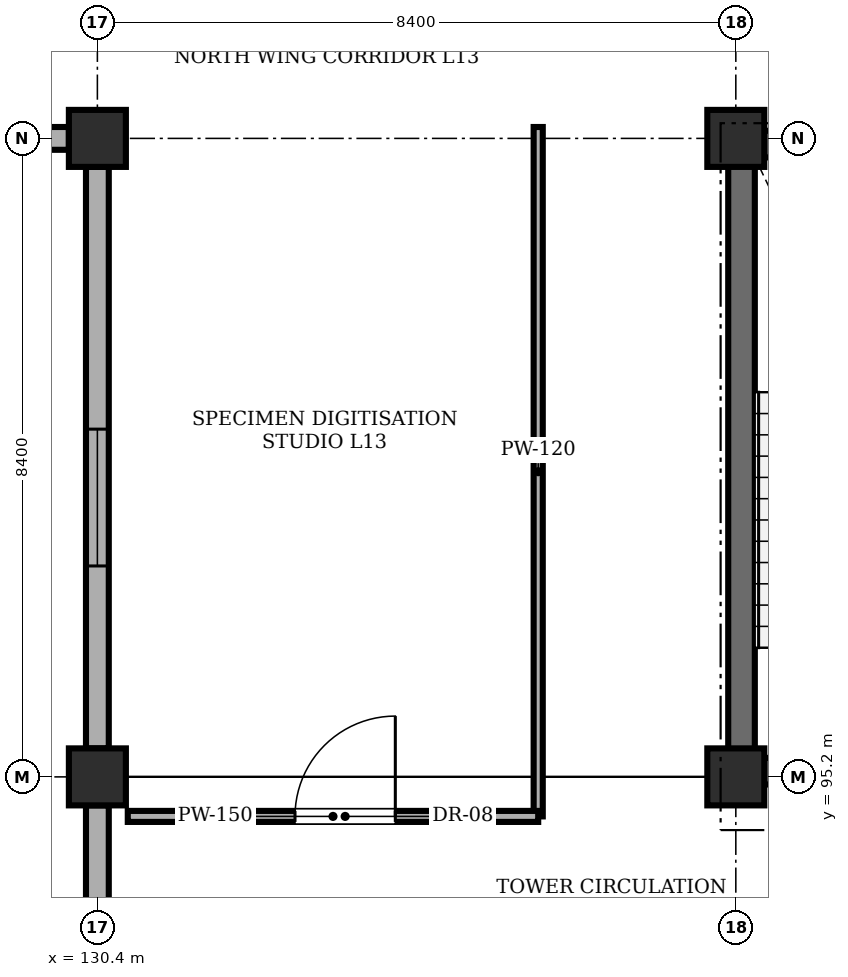
"""IFC4 building model, lengths in metres.
Left out: names, types, materials, properties, quantities, classifications, styles, units other than length and angle.
Written with IfcOpenShell. Run it as: python <this file> out.ifc"""

import sys

from ifc_helpers import new_model, si_unit, direction, frame, frame_2d, origin, origin_2d, place, context, subcontext, project, spatial, rectangle, extrude, element, fill, save


model = new_model("IFC4")
c1 = context("Model", 3, precision=1e-05, world=origin(), true_north=direction((0.0, 1.0)))
c2 = subcontext(c1, "Body", "Model", "MODEL_VIEW")
j1 = project(units=[si_unit("LENGTHUNIT", "METRE"), si_unit("PLANEANGLEUNIT", "RADIAN")], contexts=[c1])
p1 = place(None, origin())
s1 = spatial("IfcSite", under=j1, at=p1, CompositionType="ELEMENT")
p2 = place(p1, origin())
s2 = spatial("IfcBuilding", under=s1, at=p2, CompositionType="ELEMENT")
p3 = place(p2, frame((0.0, 0.0, 52.8)))
s3 = spatial("IfcBuildingStorey", under=s2, at=p3, CompositionType="ELEMENT", Elevation=52.8)
for number, where, z_axis, x_axis in (
    (1, (130.4, 95.2, 0.0), (0.0, 0.0, 1.0), (1.0, 0.0, 0.0)),
    (2, (130.4, 103.6, 0.0), (0.0, 0.0, 1.0), (1.0, 0.0, 0.0)),
    (3, (138.8, 95.2, 0.0), (0.0, 0.0, 1.0), (1.0, 0.0, 0.0)),
    (4, (138.8, 103.6, 0.0), (0.0, 0.0, 1.0), (1.0, 0.0, 0.0)),
):
    element("IfcColumn", number, at=place(p3, frame(where, z_axis=z_axis, x_axis=x_axis)), inside=s3, PredefinedType="COLUMN", context=c2, shape_type="SweptSolid", body=[
        extrude(rectangle(XDim=0.75, YDim=0.75, at=origin_2d()), origin(), (0.0, 0.0, 1.0), 4.03),
    ])
for number, where, z_axis, x_axis in (
    (5, (138.7, 95.275, 0.0), (0.0, 0.0, 1.0), (1.0, 0.0, 0.0)),
    (6, (138.7, 103.525, 0.0), (0.0, 0.0, 1.0), (1.0, 0.0, 0.0)),
):
    element("IfcWall", number, at=place(p3, frame(where, z_axis=z_axis, x_axis=x_axis)), inside=s3, PredefinedType="SHEAR", context=c2, shape_type="SweptSolid", body=[
        extrude(rectangle(XDim=3.8, YDim=0.35, at=frame_2d((1.9, 0.0))), origin(), (0.0, 0.0, 1.0), 4.03),
    ])
p4 = place(p3, frame((138.875, 95.45, 0.0), z_axis=(0.0, 0.0, 1.0), x_axis=(0.0, 1.0, 0.0)))
e7 = element("IfcWall", 7, at=p4, inside=s3, PredefinedType="SHEAR", context=c2, shape_type="SweptSolid", body=[
    extrude(rectangle(XDim=7.9, YDim=0.35, at=frame_2d((3.95, 0.0))), origin(), (0.0, 0.0, 1.0), 4.03),
])
p5 = place(p3, frame((130.4, 92.15, 0.0), z_axis=(0.0, 0.0, 1.0), x_axis=(0.0, 1.0, 0.0)))
e8 = element("IfcWall", 8, at=p5, inside=s3, PredefinedType="STANDARD", context=c2, shape_type="SweptSolid", body=[
    extrude(rectangle(XDim=2.675, YDim=0.3, at=frame_2d((1.337, 0.0))), origin(), (0.0, 0.0, 1.0), 4.03),
])
p6 = place(p3, frame((130.4, 95.575, 0.0), z_axis=(0.0, 0.0, 1.0), x_axis=(0.0, 1.0, 0.0)))
e9 = element("IfcWall", 9, at=p6, inside=s3, PredefinedType="STANDARD", context=c2, shape_type="SweptSolid", body=[
    extrude(rectangle(XDim=7.65, YDim=0.3, at=frame_2d((3.825, 0.0))), origin(), (0.0, 0.0, 1.0), 3.33),
])
p7 = place(p6, frame((2.4, 0.0, 1.0)))
e10 = element("IfcOpeningElement", 10, at=p7, cuts=e9, PredefinedType="OPENING", context=c2, shape_type="SweptSolid", body=[
    extrude(rectangle(XDim=1.8, YDim=1.8, at=frame_2d((0.9, 0.9))), frame((0.0, 0.16, 0.0), z_axis=(0.0, -1.0, 0.0), x_axis=(1.0, 0.0, 0.0)), (0.0, 0.0, 1.0), 0.32),
])
p8 = place(p3, frame((130.025, 103.6, 0.0), z_axis=(0.0, 0.0, 1.0), x_axis=(-1.0, 0.0, 0.0)))
e11 = element("IfcWall", 11, at=p8, inside=s3, PredefinedType="STANDARD", context=c2, shape_type="SweptSolid", body=[
    extrude(rectangle(XDim=7.65, YDim=0.3, at=frame_2d((3.825, 0.0))), origin(), (0.0, 0.0, 1.0), 3.33),
])
p9 = place(p3, frame((136.2, 94.68, 0.0), z_axis=(0.0, 0.0, 1.0), x_axis=(0.0, 1.0, 0.0)))
e12 = element("IfcWall", 12, at=p9, inside=s3, PredefinedType="PARTITIONING", context=c2, shape_type="SweptSolid", body=[
    extrude(rectangle(XDim=9.07, YDim=0.12, at=frame_2d((4.535, 0.0))), origin(), (0.0, 0.0, 1.0), 4.03),
])
p10 = place(p3, frame((130.8, 94.68, 0.0), z_axis=(0.0, 0.0, 1.0), x_axis=(1.0, 0.0, 0.0)))
e13 = element("IfcWall", 13, at=p10, inside=s3, PredefinedType="PARTITIONING", context=c2, shape_type="SweptSolid", body=[
    extrude(rectangle(XDim=5.4, YDim=0.145, at=frame_2d((2.7, 0.0))), origin(), (0.0, 0.0, 1.0), 4.03),
])
p11 = place(p10, frame((2.2, 0.0, 0.0)))
e14 = element("IfcOpeningElement", 14, at=p11, cuts=e13, PredefinedType="OPENING", context=c2, shape_type="SweptSolid", body=[
    extrude(rectangle(XDim=1.32, YDim=2.2, at=frame_2d((0.66, 1.1))), frame((0.0, 0.083, 0.0), z_axis=(0.0, -1.0, 0.0), x_axis=(1.0, 0.0, 0.0)), (0.0, 0.0, 1.0), 0.165),
])
p12 = place(p7, origin())
e15 = element("IfcWindow", 15, at=p12, inside=s3, PartitioningType="DOUBLE_PANEL_VERTICAL", PredefinedType="WINDOW", context=c2, shape_type="SweptSolid", body=[
    extrude(rectangle(XDim=1.8, YDim=1.8, at=frame_2d((0.9, 0.9))), frame((0.0, 0.03, 0.0), z_axis=(0.0, -1.0, 0.0), x_axis=(1.0, 0.0, 0.0)), (0.0, 0.0, 1.0), 0.06),
])
fill(e10, e15)
p13 = place(p11, origin())
e16 = element("IfcDoor", 16, at=p13, inside=s3, OperationType="SINGLE_SWING_RIGHT", PredefinedType="DOOR", context=c2, shape_type="SweptSolid", body=[
    extrude(rectangle(XDim=1.32, YDim=2.2, at=frame_2d((0.66, 1.1))), frame((0.0, 0.025, 0.0), z_axis=(0.0, -1.0, 0.0), x_axis=(1.0, 0.0, 0.0)), (0.0, 0.0, 1.0), 0.05),
])
fill(e14, e16)
save(model, sys.argv[1])
